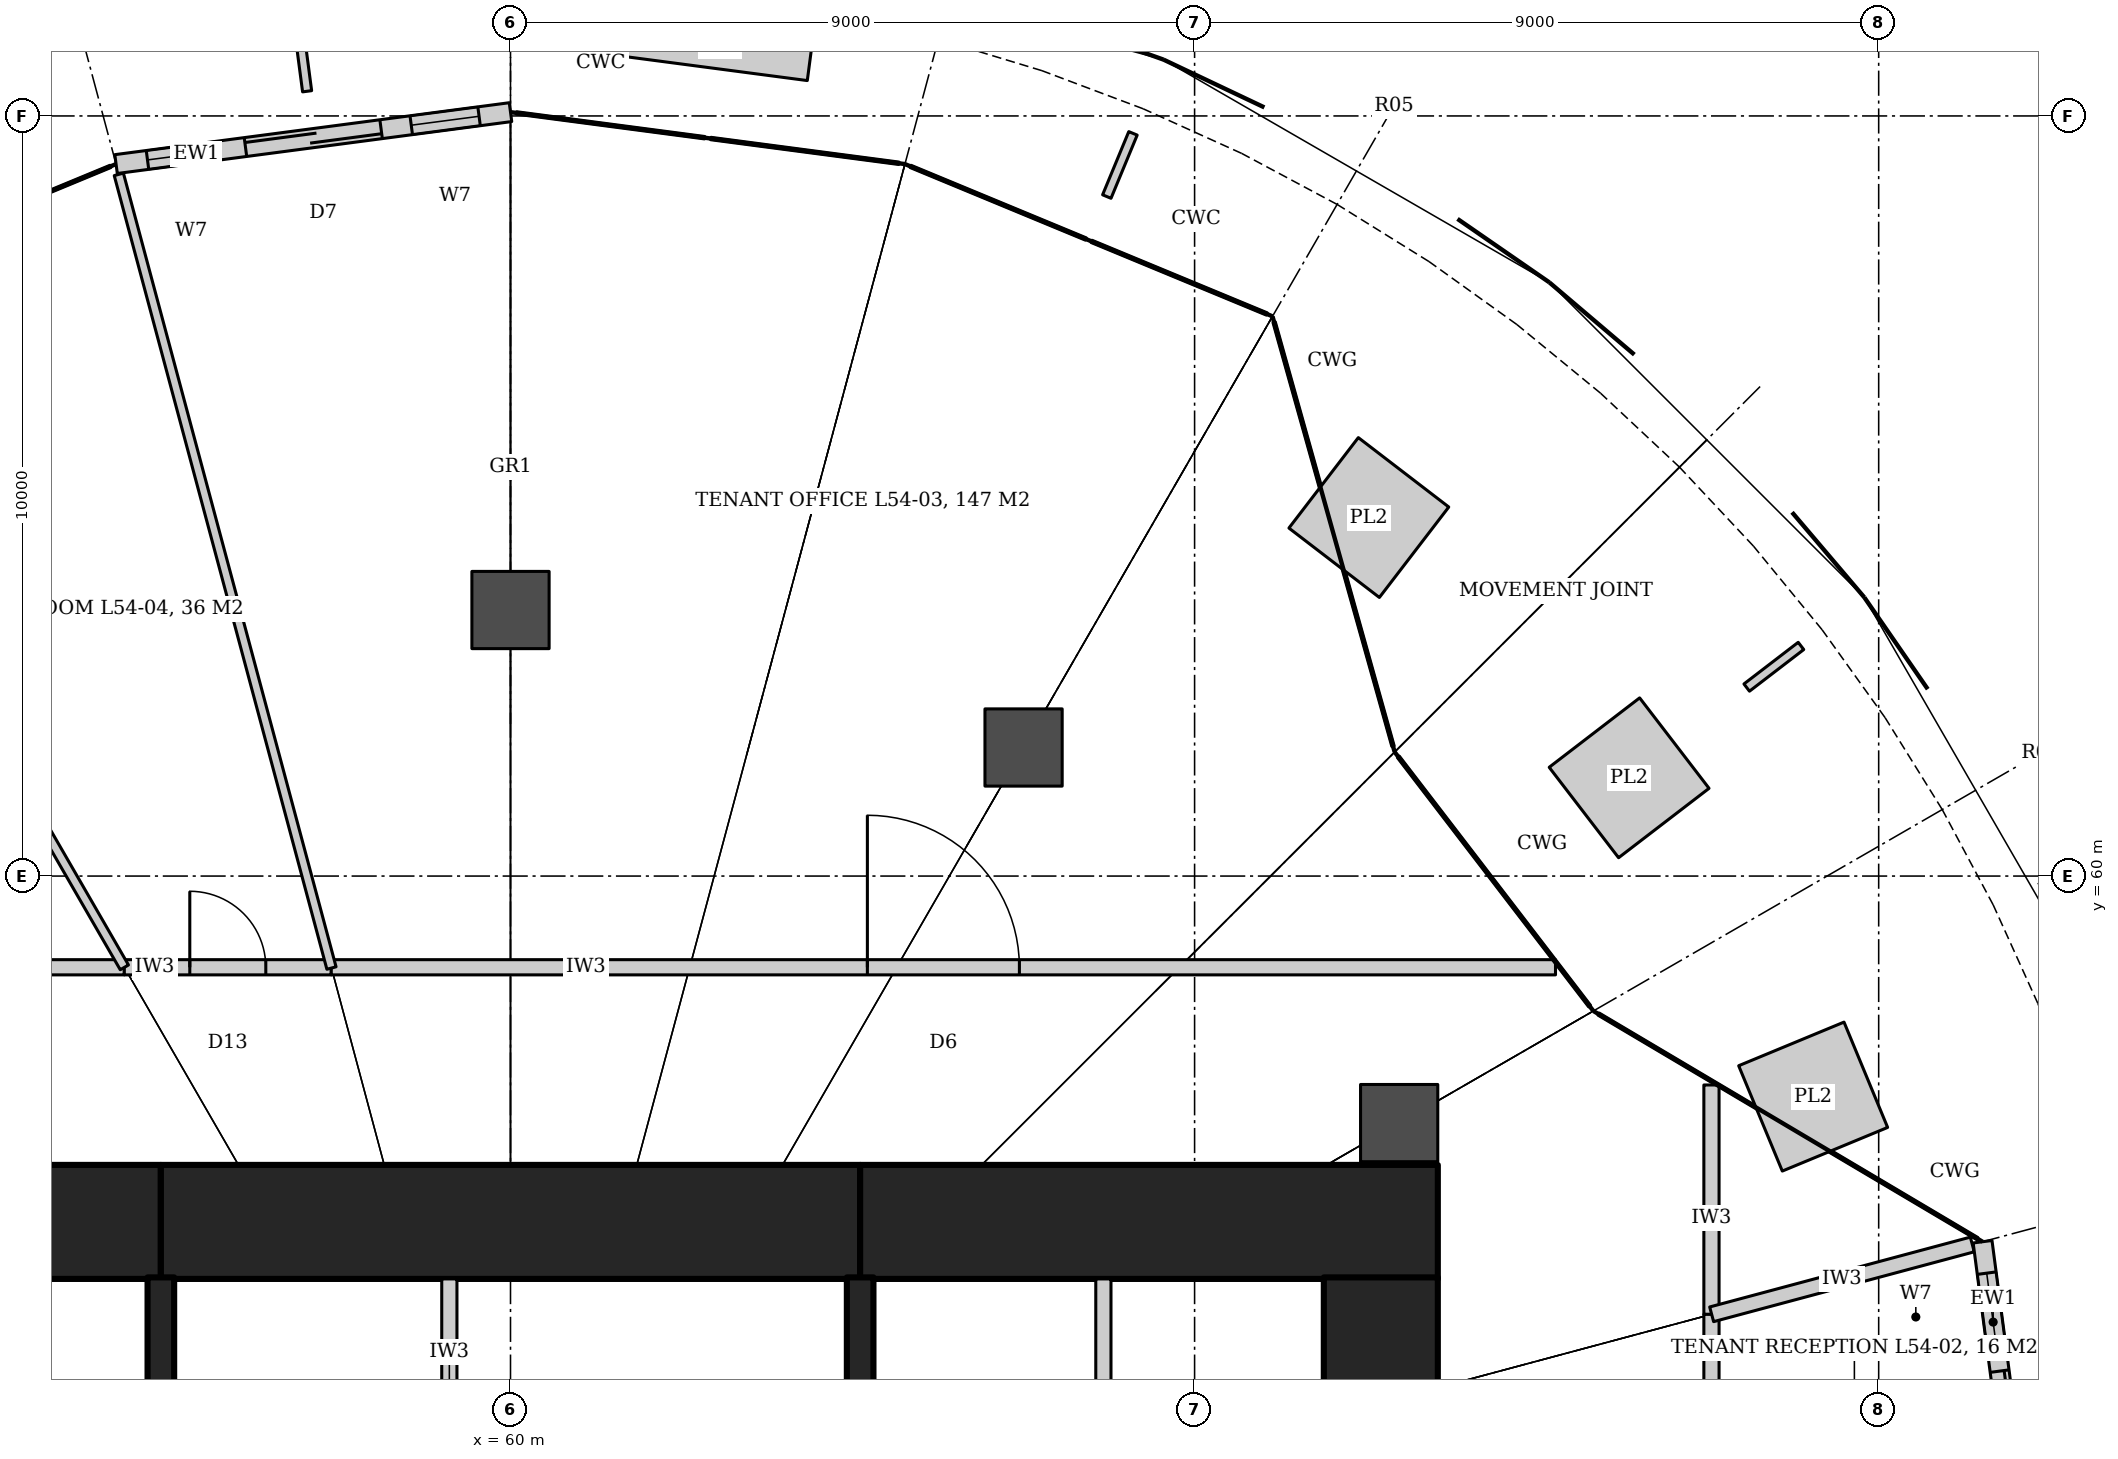
"""IFC4 building model, lengths in metres.
Left out: names, types, materials, properties, quantities, classifications, styles, units other than length and angle.
Written with IfcOpenShell. Run it as: python <this file> out.ifc"""

import sys

from ifc_helpers import new_model, si_unit, direction, frame, frame_2d, origin, origin_2d, place, context, subcontext, project, spatial, rectangle, hollow_circle, extrude, element, fill, save


model = new_model("IFC4")
c1 = context("Model", 3, precision=1e-05, world=origin(), true_north=direction((0.0, 1.0)))
c2 = subcontext(c1, "Body", "Model", "MODEL_VIEW")
j1 = project(units=[si_unit("LENGTHUNIT", "METRE"), si_unit("PLANEANGLEUNIT", "RADIAN")], contexts=[c1])
p1 = place(None, origin())
s1 = spatial("IfcSite", under=j1, at=p1, CompositionType="ELEMENT")
p2 = place(p1, origin())
s2 = spatial("IfcBuilding", under=s1, at=p2, CompositionType="ELEMENT")
p3 = place(p2, frame((0.0, 0.0, 227.6)))
s3 = spatial("IfcBuildingStorey", under=s2, at=p3, CompositionType="ELEMENT", Elevation=227.6)
p4 = place(p3, frame((47.8, 55.45, 0.0), z_axis=(0.0, 0.0, 1.0), x_axis=(1.0, 0.0, 0.0)))
e1 = element("IfcWall", 1, at=p4, inside=s3, PredefinedType="SHEAR", context=c2, shape_type="SweptSolid", body=[
    extrude(rectangle(XDim=7.6, YDim=1.5, at=frame_2d((3.8, 0.0))), origin(), (0.0, 0.0, 1.0), 4.2),
])
p5 = place(p3, frame((55.4, 55.45, 0.0), z_axis=(0.0, 0.0, 1.0), x_axis=(1.0, 0.0, 0.0)))
e2 = element("IfcWall", 2, at=p5, inside=s3, PredefinedType="SHEAR", context=c2, shape_type="SweptSolid", body=[
    extrude(rectangle(XDim=9.2, YDim=1.5, at=frame_2d((4.6, 0.0))), origin(), (0.0, 0.0, 1.0), 4.2),
])
p6 = place(p3, frame((64.6, 55.45, 0.0), z_axis=(0.0, 0.0, 1.0), x_axis=(1.0, 0.0, 0.0)))
e3 = element("IfcWall", 3, at=p6, inside=s3, PredefinedType="SHEAR", context=c2, shape_type="SweptSolid", body=[
    extrude(rectangle(XDim=7.6, YDim=1.5, at=frame_2d((3.8, 0.0))), origin(), (0.0, 0.0, 1.0), 4.2),
])
p7 = place(p3, frame((71.45, 51.5, 0.0), z_axis=(0.0, 0.0, 1.0), x_axis=(0.0, 1.0, 0.0)))
e4 = element("IfcWall", 4, at=p7, inside=s3, PredefinedType="SHEAR", context=c2, shape_type="SweptSolid", body=[
    extrude(rectangle(XDim=3.22, YDim=1.5, at=frame_2d((1.61, 0.0))), origin(), (0.0, 0.0, 1.0), 4.2),
])
for number, where, z_axis, x_axis in (
    (5, (55.4, 51.655, 0.0), (0.0, 0.0, 1.0), (0.0, 1.0, 0.0)),
    (6, (64.6, 51.655, 0.0), (0.0, 0.0, 1.0), (0.0, 1.0, 0.0)),
):
    element("IfcWall", number, at=place(p3, frame(where, z_axis=z_axis, x_axis=x_axis)), inside=s3, PredefinedType="SHEAR", context=c2, shape_type="SweptSolid", body=[
        extrude(rectangle(XDim=3.065, YDim=0.35, at=frame_2d((1.532, 0.0))), origin(), (0.0, 0.0, 1.0), 4.2),
    ])
for number, where, z_axis, x_axis in (
    (7, (71.691, 56.75, 0.0), (0.0, 0.0, 1.0), (1.0, 0.0, 0.0)),
    (8, (66.75, 61.691, 0.0), (0.0, 0.0, 1.0), (1.0, 0.0, 0.0)),
    (9, (60.0, 63.5, 0.0), (0.0, 0.0, 1.0), (1.0, 0.0, 0.0)),
):
    element("IfcColumn", number, at=place(p3, frame(where, z_axis=z_axis, x_axis=x_axis)), inside=s3, PredefinedType="COLUMN", context=c2, shape_type="SweptSolid", body=[
        extrude(hollow_circle(Radius=0.508, WallThickness=0.05, at=origin_2d()), origin(), (0.0, 0.0, 1.0), 4.2),
    ])
p8 = place(p3, frame((51.2, 58.8, 0.0), z_axis=(0.0, 0.0, 1.0), x_axis=(1.0, 0.0, 0.0)))
e10 = element("IfcWall", 10, at=p8, inside=s3, PredefinedType="PARTITIONING", context=c2, shape_type="SweptSolid", body=[
    extrude(rectangle(XDim=3.719, YDim=0.2, at=frame_2d((1.86, 0.0))), origin(), (0.0, 0.0, 1.0), 3.04),
])
p9 = place(p8, frame((1.06, 0.0, 0.0)))
e11 = element("IfcOpeningElement", 11, at=p9, cuts=e10, PredefinedType="OPENING", context=c2, shape_type="SweptSolid", body=[
    extrude(rectangle(XDim=1.6, YDim=2.4, at=frame_2d((0.8, 1.2))), frame((0.0, 0.11, 0.0), z_axis=(0.0, -1.0, 0.0), x_axis=(1.0, 0.0, 0.0)), (0.0, 0.0, 1.0), 0.22),
])
p10 = place(p3, frame((54.919, 58.8, 0.0), z_axis=(0.0, 0.0, 1.0), x_axis=(1.0, 0.0, 0.0)))
e12 = element("IfcWall", 12, at=p10, inside=s3, PredefinedType="PARTITIONING", context=c2, shape_type="SweptSolid", body=[
    extrude(rectangle(XDim=2.723, YDim=0.2, at=frame_2d((1.361, 0.0))), origin(), (0.0, 0.0, 1.0), 3.04),
])
p11 = place(p10, frame((0.861, 0.0, 0.0)))
e13 = element("IfcOpeningElement", 13, at=p11, cuts=e12, PredefinedType="OPENING", context=c2, shape_type="SweptSolid", body=[
    extrude(rectangle(XDim=1.0, YDim=2.4, at=frame_2d((0.5, 1.2))), frame((0.0, 0.11, 0.0), z_axis=(0.0, -1.0, 0.0), x_axis=(1.0, 0.0, 0.0)), (0.0, 0.0, 1.0), 0.22),
])
p12 = place(p3, frame((57.642, 58.8, 0.0), z_axis=(0.0, 0.0, 1.0), x_axis=(1.0, 0.0, 0.0)))
e14 = element("IfcWall", 14, at=p12, inside=s3, PredefinedType="PARTITIONING", context=c2, shape_type="SweptSolid", body=[
    extrude(rectangle(XDim=18.158, YDim=0.2, at=frame_2d((9.079, 0.0))), origin(), (0.0, 0.0, 1.0), 3.02),
])
p13 = place(p12, frame((8.079, 0.0, 0.0)))
e15 = element("IfcOpeningElement", 15, at=p13, cuts=e14, PredefinedType="OPENING", context=c2, shape_type="SweptSolid", body=[
    extrude(rectangle(XDim=2.0, YDim=2.1, at=frame_2d((1.0, 1.05))), frame((0.0, 0.11, 0.0), z_axis=(0.0, -1.0, 0.0), x_axis=(1.0, 0.0, 0.0)), (0.0, 0.0, 1.0), 0.22),
])
p14 = place(p3, frame((75.8, 58.8, 0.0), z_axis=(0.0, 0.0, 1.0), x_axis=(0.0, -1.0, 0.0)))
e16 = element("IfcWall", 16, at=p14, inside=s3, PredefinedType="PARTITIONING", context=c2, shape_type="SweptSolid", body=[
    extrude(rectangle(XDim=4.566, YDim=0.2, at=frame_2d((2.283, 0.0))), origin(), (0.0, 0.0, 1.0), 3.02),
])
p15 = place(p3, frame((75.8, 54.234, 0.0), z_axis=(0.0, 0.0, 1.0), x_axis=(0.0, -1.0, 0.0)))
e17 = element("IfcWall", 17, at=p15, inside=s3, PredefinedType="PARTITIONING", context=c2, shape_type="SweptSolid", body=[
    extrude(rectangle(XDim=4.234, YDim=0.2, at=frame_2d((2.117, 0.0))), origin(), (0.0, 0.0, 1.0), 3.02),
])
p16 = place(p15, frame((1.317, 0.0, 0.0)))
e18 = element("IfcOpeningElement", 18, at=p16, cuts=e17, PredefinedType="OPENING", context=c2, shape_type="SweptSolid", body=[
    extrude(rectangle(XDim=1.6, YDim=2.4, at=frame_2d((0.8, 1.2))), frame((0.0, 0.11, 0.0), z_axis=(0.0, -1.0, 0.0), x_axis=(1.0, 0.0, 0.0)), (0.0, 0.0, 1.0), 0.22),
])
p17 = place(p3, frame((75.802, 54.234, 0.0), z_axis=(0.0, 0.0, 1.0), x_axis=(0.96593261366, 0.258793712962, 0.0)))
e19 = element("IfcWall", 19, at=p17, inside=s3, PredefinedType="PARTITIONING", context=c2, shape_type="SweptSolid", body=[
    extrude(rectangle(XDim=3.6, YDim=0.2, at=frame_2d((1.8, 0.0))), origin(), (0.0, 0.0, 1.0), 3.02),
])
p18 = place(p3, frame((57.645, 58.79, 0.0), z_axis=(0.0, 0.0, 1.0), x_axis=(-0.258819612444, 0.96592567427, 0.0)))
e20 = element("IfcWall", 20, at=p18, inside=s3, PredefinedType="PARTITIONING", context=c2, shape_type="SweptSolid", body=[
    extrude(rectangle(XDim=10.86, YDim=0.125, at=frame_2d((5.43, 0.0))), origin(), (0.0, 0.0, 1.0), 3.02),
])
p19 = place(p3, frame((53.511, 61.114, 0.0), z_axis=(0.0, 0.0, 1.0), x_axis=(0.866036909293, 0.499980071345, 0.0)))
e21 = element("IfcWall", 21, at=p19, inside=s3, PredefinedType="PARTITIONING", context=c2, shape_type="SweptSolid", body=[
    extrude(rectangle(XDim=0.766, YDim=0.125, at=frame_2d((0.383, 0.0))), origin(), (0.0, 0.0, 1.0), 3.02),
])
p20 = place(p3, frame((54.089, 61.52, 0.0), z_axis=(0.0, 0.0, 1.0), x_axis=(-0.499976747263, 0.866038828342, 0.0)))
e22 = element("IfcWall", 22, at=p20, inside=s3, PredefinedType="PARTITIONING", context=c2, shape_type="SweptSolid", body=[
    extrude(rectangle(XDim=1.136, YDim=0.125, at=frame_2d((0.568, 0.0))), origin(), (0.0, 0.0, 1.0), 3.02),
])
p21 = place(p3, frame((54.92, 58.799, 0.0), z_axis=(0.0, 0.0, 1.0), x_axis=(-0.499977931934, 0.866038144413, 0.0)))
e23 = element("IfcWall", 23, at=p21, inside=s3, PredefinedType="PARTITIONING", context=c2, shape_type="SweptSolid", body=[
    extrude(rectangle(XDim=2.647, YDim=0.125, at=frame_2d((1.323, 0.0))), origin(), (0.0, 0.0, 1.0), 3.04),
])
p22 = place(p3, frame((80.1, 50.0, 0.0), z_axis=(0.0, 0.0, 1.0), x_axis=(-0.130560429487, 0.991440353351, 0.0)))
e24 = element("IfcWall", 24, at=p22, inside=s3, PredefinedType="SOLIDWALL", context=c2, shape_type="SweptSolid", body=[
    extrude(rectangle(XDim=5.247, YDim=0.25, at=frame_2d((2.624, 0.0))), origin(), (0.0, 0.0, 1.0), 4.04),
])
p23 = place(p22, frame((1.724, 0.0, 0.0)))
e25 = element("IfcOpeningElement", 25, at=p23, cuts=e24, PredefinedType="OPENING", context=c2, shape_type="SweptSolid", body=[
    extrude(rectangle(XDim=1.8, YDim=2.4, at=frame_2d((0.9, 1.2))), frame((0.0, 0.135, 0.0), z_axis=(0.0, -1.0, 0.0), x_axis=(1.0, 0.0, 0.0)), (0.0, 0.0, 1.0), 0.27),
])
p24 = place(p22, frame((0.424, 0.0, 0.0)))
e26 = element("IfcOpeningElement", 26, at=p24, cuts=e24, PredefinedType="OPENING", context=c2, shape_type="SweptSolid", body=[
    extrude(rectangle(XDim=0.9, YDim=2.4, at=frame_2d((0.45, 1.2))), frame((0.0, 0.135, 0.0), z_axis=(0.0, -1.0, 0.0), x_axis=(1.0, 0.0, 0.0)), (0.0, 0.0, 1.0), 0.27),
])
p25 = place(p22, frame((3.924, 0.0, 0.0)))
e27 = element("IfcOpeningElement", 27, at=p25, cuts=e24, PredefinedType="OPENING", context=c2, shape_type="SweptSolid", body=[
    extrude(rectangle(XDim=0.9, YDim=2.4, at=frame_2d((0.45, 1.2))), frame((0.0, 0.135, 0.0), z_axis=(0.0, -1.0, 0.0), x_axis=(1.0, 0.0, 0.0)), (0.0, 0.0, 1.0), 0.27),
])
p26 = place(p3, frame((60.0, 70.1, 0.0), z_axis=(0.0, 0.0, 1.0), x_axis=(-0.991440353351, -0.130560429487, 0.0)))
e28 = element("IfcWall", 28, at=p26, inside=s3, PredefinedType="SOLIDWALL", context=c2, shape_type="SweptSolid", body=[
    extrude(rectangle(XDim=5.247, YDim=0.25, at=frame_2d((2.624, 0.0))), origin(), (0.0, 0.0, 1.0), 4.04),
])
p27 = place(p26, frame((1.724, 0.0, 0.0)))
e29 = element("IfcOpeningElement", 29, at=p27, cuts=e28, PredefinedType="OPENING", context=c2, shape_type="SweptSolid", body=[
    extrude(rectangle(XDim=1.8, YDim=2.4, at=frame_2d((0.9, 1.2))), frame((0.0, 0.135, 0.0), z_axis=(0.0, -1.0, 0.0), x_axis=(1.0, 0.0, 0.0)), (0.0, 0.0, 1.0), 0.27),
])
p28 = place(p26, frame((0.424, 0.0, 0.0)))
e30 = element("IfcOpeningElement", 30, at=p28, cuts=e28, PredefinedType="OPENING", context=c2, shape_type="SweptSolid", body=[
    extrude(rectangle(XDim=0.9, YDim=2.4, at=frame_2d((0.45, 1.2))), frame((0.0, 0.135, 0.0), z_axis=(0.0, -1.0, 0.0), x_axis=(1.0, 0.0, 0.0)), (0.0, 0.0, 1.0), 0.27),
])
p29 = place(p26, frame((3.924, 0.0, 0.0)))
e31 = element("IfcOpeningElement", 31, at=p29, cuts=e28, PredefinedType="OPENING", context=c2, shape_type="SweptSolid", body=[
    extrude(rectangle(XDim=0.9, YDim=2.4, at=frame_2d((0.45, 1.2))), frame((0.0, 0.135, 0.0), z_axis=(0.0, -1.0, 0.0), x_axis=(1.0, 0.0, 0.0)), (0.0, 0.0, 1.0), 0.27),
])
p30 = place(p3, frame((67.8, 51.675, 0.0), z_axis=(0.0, 0.0, 1.0), x_axis=(0.0, 1.0, 0.0)))
e32 = element("IfcWall", 32, at=p30, inside=s3, PredefinedType="PARTITIONING", context=c2, shape_type="SweptSolid", body=[
    extrude(rectangle(XDim=3.025, YDim=0.2, at=frame_2d((1.512, 0.0))), origin(), (0.0, 0.0, 1.0), 4.2),
])
p31 = place(p3, frame((59.196, 51.675, 0.0), z_axis=(0.0, 0.0, 1.0), x_axis=(0.0, 1.0, 0.0)))
e33 = element("IfcWall", 33, at=p31, inside=s3, PredefinedType="PARTITIONING", context=c2, shape_type="SweptSolid", body=[
    extrude(rectangle(XDim=3.025, YDim=0.2, at=frame_2d((1.512, 0.0))), origin(), (0.0, 0.0, 1.0), 4.04),
])
p32 = place(p13, origin())
e34 = element("IfcDoor", 34, at=p32, inside=s3, OperationType="DOUBLE_DOOR_DOUBLE_SWING", PredefinedType="DOOR", context=c2, shape_type="SweptSolid", body=[
    extrude(rectangle(XDim=2.0, YDim=2.1, at=frame_2d((1.0, 1.05))), frame((0.0, 0.025, 0.0), z_axis=(0.0, -1.0, 0.0), x_axis=(1.0, 0.0, 0.0)), (0.0, 0.0, 1.0), 0.05),
])
fill(e15, e34)
p33 = place(p11, origin())
e35 = element("IfcDoor", 35, at=p33, inside=s3, OperationType="SINGLE_SWING_LEFT", PredefinedType="DOOR", context=c2, shape_type="SweptSolid", body=[
    extrude(rectangle(XDim=1.0, YDim=2.4, at=frame_2d((0.5, 1.2))), frame((0.0, 0.025, 0.0), z_axis=(0.0, -1.0, 0.0), x_axis=(1.0, 0.0, 0.0)), (0.0, 0.0, 1.0), 0.05),
])
fill(e13, e35)
p34 = place(p23, origin())
e36 = element("IfcDoor", 36, at=p34, inside=s3, OperationType="DOUBLE_DOOR_SLIDING", PredefinedType="DOOR", context=c2, shape_type="SweptSolid", body=[
    extrude(rectangle(XDim=1.8, YDim=2.4, at=frame_2d((0.9, 1.2))), frame((0.0, 0.025, 0.0), z_axis=(0.0, -1.0, 0.0), x_axis=(1.0, 0.0, 0.0)), (0.0, 0.0, 1.0), 0.05),
])
fill(e25, e36)
p35 = place(p25, origin())
e37 = element("IfcWindow", 37, at=p35, inside=s3, PartitioningType="SINGLE_PANEL", PredefinedType="WINDOW", context=c2, shape_type="SweptSolid", body=[
    extrude(rectangle(XDim=0.9, YDim=2.4, at=frame_2d((0.45, 1.2))), frame((0.0, 0.03, 0.0), z_axis=(0.0, -1.0, 0.0), x_axis=(1.0, 0.0, 0.0)), (0.0, 0.0, 1.0), 0.06),
])
fill(e27, e37)
p36 = place(p27, origin())
e38 = element("IfcDoor", 38, at=p36, inside=s3, OperationType="DOUBLE_DOOR_SLIDING", PredefinedType="DOOR", context=c2, shape_type="SweptSolid", body=[
    extrude(rectangle(XDim=1.8, YDim=2.4, at=frame_2d((0.9, 1.2))), frame((0.0, 0.025, 0.0), z_axis=(0.0, -1.0, 0.0), x_axis=(1.0, 0.0, 0.0)), (0.0, 0.0, 1.0), 0.05),
])
fill(e29, e38)
p37 = place(p28, origin())
e39 = element("IfcWindow", 39, at=p37, inside=s3, PartitioningType="SINGLE_PANEL", PredefinedType="WINDOW", context=c2, shape_type="SweptSolid", body=[
    extrude(rectangle(XDim=0.9, YDim=2.4, at=frame_2d((0.45, 1.2))), frame((0.0, 0.03, 0.0), z_axis=(0.0, -1.0, 0.0), x_axis=(1.0, 0.0, 0.0)), (0.0, 0.0, 1.0), 0.06),
])
fill(e30, e39)
p38 = place(p29, origin())
e40 = element("IfcWindow", 40, at=p38, inside=s3, PartitioningType="SINGLE_PANEL", PredefinedType="WINDOW", context=c2, shape_type="SweptSolid", body=[
    extrude(rectangle(XDim=0.9, YDim=2.4, at=frame_2d((0.45, 1.2))), frame((0.0, 0.03, 0.0), z_axis=(0.0, -1.0, 0.0), x_axis=(1.0, 0.0, 0.0)), (0.0, 0.0, 1.0), 0.06),
])
fill(e31, e40)
save(model, sys.argv[1])
